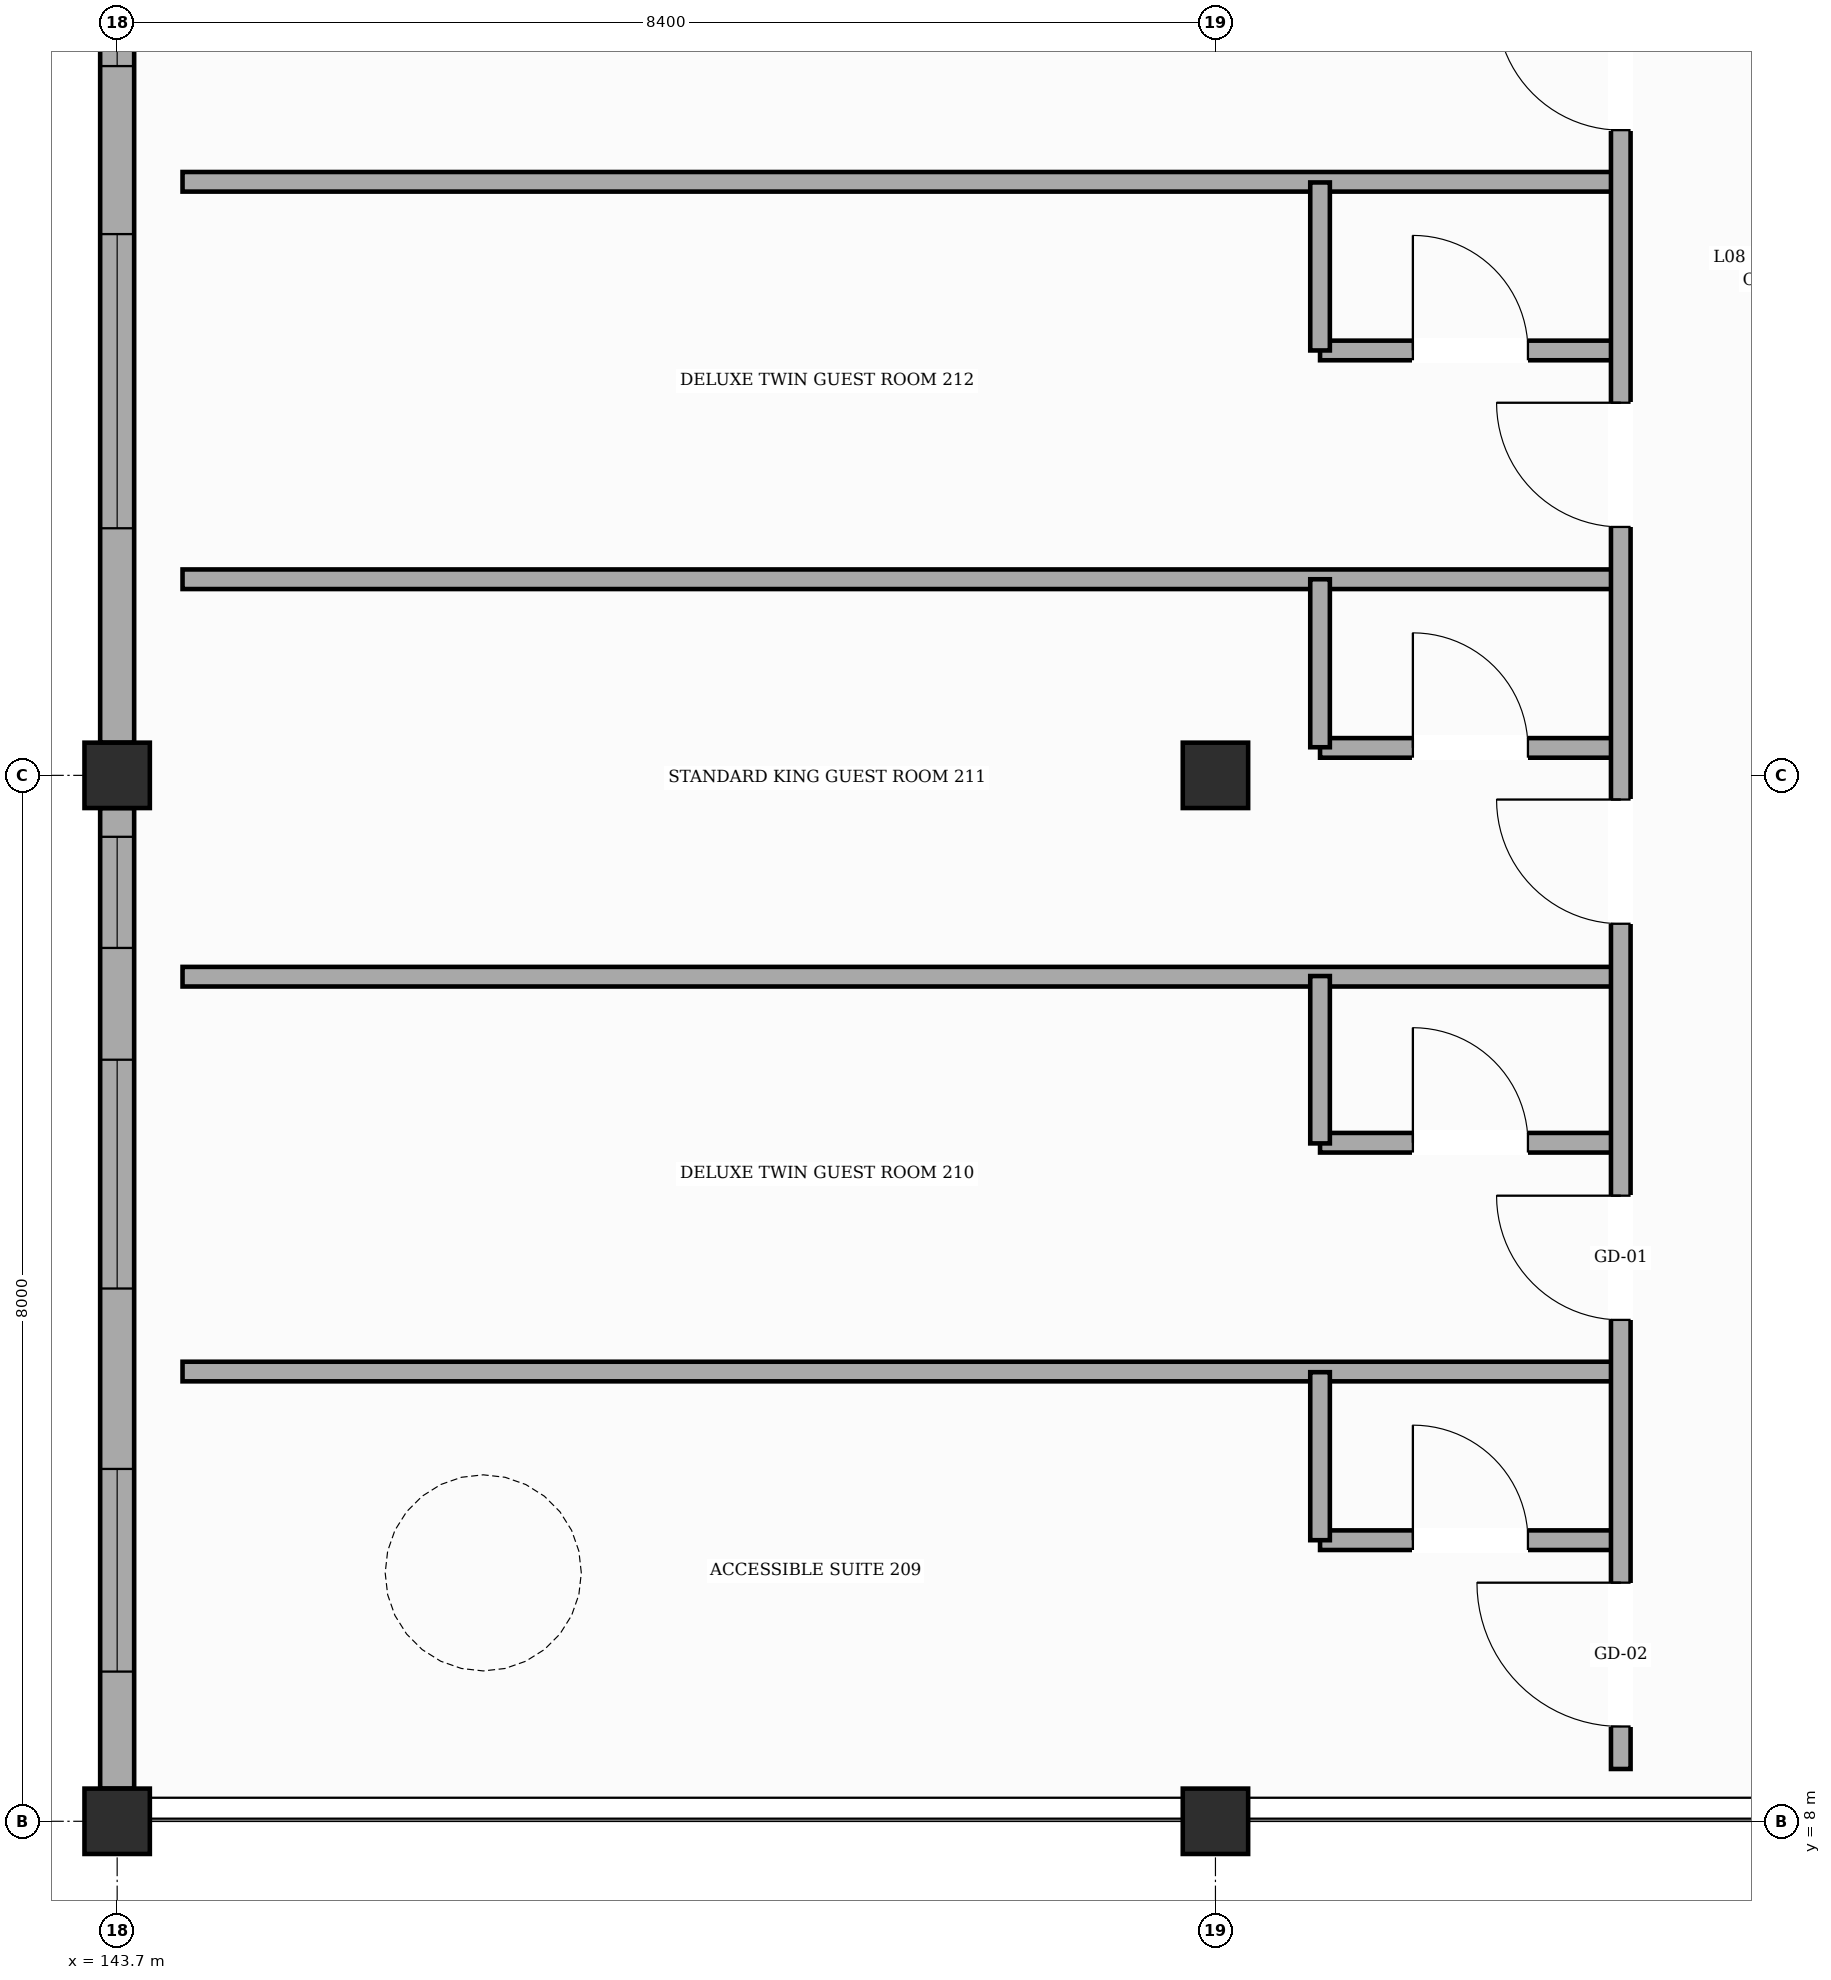
"""IFC4 building model, lengths in metres.
Left out: names, types, materials, properties, quantities, classifications, styles, units other than length and angle.
Written with IfcOpenShell. Run it as: python <this file> out.ifc"""

import sys

from ifc_helpers import new_model, si_unit, direction, frame, frame_2d, origin, origin_2d, place, context, subcontext, project, spatial, rectangle, hollow_rectangle, extrude, element, fill, save


model = new_model("IFC4")
c1 = context("Model", 3, precision=1e-05, world=origin(), true_north=direction((0.0, 1.0)))
c2 = subcontext(c1, "Body", "Model", "MODEL_VIEW")
j1 = project(units=[si_unit("LENGTHUNIT", "METRE"), si_unit("PLANEANGLEUNIT", "RADIAN")], contexts=[c1])
p1 = place(None, origin())
s1 = spatial("IfcSite", under=j1, at=p1, CompositionType="ELEMENT")
p2 = place(p1, origin())
s2 = spatial("IfcBuilding", under=s1, at=p2, CompositionType="ELEMENT")
p3 = place(p2, frame((0.0, 0.0, 35.4)))
s3 = spatial("IfcBuildingStorey", under=s2, at=p3, CompositionType="ELEMENT", Elevation=35.4)
for number, where, z_axis, x_axis in (
    (1, (143.7, 8.0, 0.0), (0.0, 0.0, 1.0), (1.0, 0.0, 0.0)),
    (2, (143.7, 16.0, 0.0), (0.0, 0.0, 1.0), (1.0, 0.0, 0.0)),
    (3, (152.1, 8.0, 0.0), (0.0, 0.0, 1.0), (1.0, 0.0, 0.0)),
    (4, (152.1, 16.0, 0.0), (0.0, 0.0, 1.0), (1.0, 0.0, 0.0)),
):
    element("IfcColumn", number, at=place(p3, frame(where, z_axis=z_axis, x_axis=x_axis)), inside=s3, PredefinedType="COLUMN", context=c2, shape_type="SweptSolid", body=[
        extrude(hollow_rectangle(XDim=0.5, YDim=0.5, WallThickness=0.022, InnerFilletRadius=0.022, OuterFilletRadius=0.044, at=origin_2d()), origin(), (0.0, 0.0, 1.0), 3.6),
    ])
p4 = place(p3, frame((143.7, 8.25, 0.0), z_axis=(0.0, 0.0, 1.0), x_axis=(0.0, 1.0, 0.0)))
e5 = element("IfcWall", 5, at=p4, inside=s3, PredefinedType="SOLIDWALL", context=c2, shape_type="SweptSolid", body=[
    extrude(rectangle(XDim=7.5, YDim=0.26, at=frame_2d((3.75, 0.0))), origin(), (0.0, 0.0, 1.0), 2.805),
])
p5 = place(p4, frame((0.895, 0.0, 0.85)))
e6 = element("IfcOpeningElement", 6, at=p5, cuts=e5, PredefinedType="OPENING", context=c2, shape_type="SweptSolid", body=[
    extrude(rectangle(XDim=1.55, YDim=1.35, at=frame_2d((0.775, 0.675))), frame((0.0, 0.14, 0.0), z_axis=(0.0, -1.0, 0.0), x_axis=(1.0, 0.0, 0.0)), (0.0, 0.0, 1.0), 0.28),
])
p6 = place(p4, frame((3.825, 0.0, 0.85)))
e7 = element("IfcOpeningElement", 7, at=p6, cuts=e5, PredefinedType="OPENING", context=c2, shape_type="SweptSolid", body=[
    extrude(rectangle(XDim=1.75, YDim=1.35, at=frame_2d((0.875, 0.675))), frame((0.0, 0.14, 0.0), z_axis=(0.0, -1.0, 0.0), x_axis=(1.0, 0.0, 0.0)), (0.0, 0.0, 1.0), 0.28),
])
p7 = place(p4, frame((6.43, 0.0, 0.85)))
e8 = element("IfcOpeningElement", 8, at=p7, cuts=e5, PredefinedType="OPENING", context=c2, shape_type="SweptSolid", body=[
    extrude(rectangle(XDim=0.85, YDim=1.35, at=frame_2d((0.425, 0.675))), frame((0.0, 0.14, 0.0), z_axis=(0.0, -1.0, 0.0), x_axis=(1.0, 0.0, 0.0)), (0.0, 0.0, 1.0), 0.28),
])
p8 = place(p3, frame((143.7, 16.25, 0.0), z_axis=(0.0, 0.0, 1.0), x_axis=(0.0, 1.0, 0.0)))
e9 = element("IfcWall", 9, at=p8, inside=s3, PredefinedType="SOLIDWALL", context=c2, shape_type="SweptSolid", body=[
    extrude(rectangle(XDim=7.5, YDim=0.26, at=frame_2d((3.75, 0.0))), origin(), (0.0, 0.0, 1.0), 2.805),
])
p9 = place(p8, frame((1.64, 0.0, 0.85)))
e10 = element("IfcOpeningElement", 10, at=p9, cuts=e9, PredefinedType="OPENING", context=c2, shape_type="SweptSolid", body=[
    extrude(rectangle(XDim=2.25, YDim=1.35, at=frame_2d((1.125, 0.675))), frame((0.0, 0.14, 0.0), z_axis=(0.0, -1.0, 0.0), x_axis=(1.0, 0.0, 0.0)), (0.0, 0.0, 1.0), 0.28),
])
p10 = place(p8, frame((5.175, 0.0, 0.85)))
e11 = element("IfcOpeningElement", 11, at=p10, cuts=e9, PredefinedType="OPENING", context=c2, shape_type="SweptSolid", body=[
    extrude(rectangle(XDim=1.25, YDim=1.35, at=frame_2d((0.625, 0.675))), frame((0.0, 0.14, 0.0), z_axis=(0.0, -1.0, 0.0), x_axis=(1.0, 0.0, 0.0)), (0.0, 0.0, 1.0), 0.28),
])
p11 = place(p3, frame((152.9, 10.15, 0.0), z_axis=(0.0, 0.0, 1.0), x_axis=(1.0, 0.0, 0.0)))
e12 = element("IfcWall", 12, at=p11, inside=s3, PredefinedType="PARTITIONING", context=c2, shape_type="SweptSolid", body=[
    extrude(rectangle(XDim=2.3, YDim=0.15, at=frame_2d((1.15, 0.0))), origin(), (0.0, 0.0, 1.0), 3.365),
])
p12 = place(p11, frame((0.71, 0.0, 0.0)))
e13 = element("IfcOpeningElement", 13, at=p12, cuts=e12, PredefinedType="OPENING", context=c2, shape_type="SweptSolid", body=[
    extrude(rectangle(XDim=0.88, YDim=2.12, at=frame_2d((0.44, 1.06))), frame((0.0, 0.085, 0.0), z_axis=(0.0, -1.0, 0.0), x_axis=(1.0, 0.0, 0.0)), (0.0, 0.0, 1.0), 0.17),
])
p13 = place(p3, frame((144.2, 11.44, 0.0), z_axis=(0.0, 0.0, 1.0), x_axis=(1.0, 0.0, 0.0)))
e14 = element("IfcWall", 14, at=p13, inside=s3, PredefinedType="PARTITIONING", context=c2, shape_type="SweptSolid", body=[
    extrude(rectangle(XDim=11.0, YDim=0.15, at=frame_2d((5.5, 0.0))), origin(), (0.0, 0.0, 1.0), 3.365),
])
p14 = place(p3, frame((152.9, 13.19, 0.0), z_axis=(0.0, 0.0, 1.0), x_axis=(1.0, 0.0, 0.0)))
e15 = element("IfcWall", 15, at=p14, inside=s3, PredefinedType="PARTITIONING", context=c2, shape_type="SweptSolid", body=[
    extrude(rectangle(XDim=2.3, YDim=0.15, at=frame_2d((1.15, 0.0))), origin(), (0.0, 0.0, 1.0), 3.365),
])
p15 = place(p14, frame((0.71, 0.0, 0.0)))
e16 = element("IfcOpeningElement", 16, at=p15, cuts=e15, PredefinedType="OPENING", context=c2, shape_type="SweptSolid", body=[
    extrude(rectangle(XDim=0.88, YDim=2.12, at=frame_2d((0.44, 1.06))), frame((0.0, 0.085, 0.0), z_axis=(0.0, -1.0, 0.0), x_axis=(1.0, 0.0, 0.0)), (0.0, 0.0, 1.0), 0.17),
])
p16 = place(p3, frame((144.2, 14.46, 0.0), z_axis=(0.0, 0.0, 1.0), x_axis=(1.0, 0.0, 0.0)))
e17 = element("IfcWall", 17, at=p16, inside=s3, PredefinedType="PARTITIONING", context=c2, shape_type="SweptSolid", body=[
    extrude(rectangle(XDim=11.0, YDim=0.15, at=frame_2d((5.5, 0.0))), origin(), (0.0, 0.0, 1.0), 3.365),
])
p17 = place(p3, frame((152.9, 16.21, 0.0), z_axis=(0.0, 0.0, 1.0), x_axis=(1.0, 0.0, 0.0)))
e18 = element("IfcWall", 18, at=p17, inside=s3, PredefinedType="PARTITIONING", context=c2, shape_type="SweptSolid", body=[
    extrude(rectangle(XDim=2.3, YDim=0.15, at=frame_2d((1.15, 0.0))), origin(), (0.0, 0.0, 1.0), 2.755),
])
p18 = place(p17, frame((0.71, 0.0, 0.0)))
e19 = element("IfcOpeningElement", 19, at=p18, cuts=e18, PredefinedType="OPENING", context=c2, shape_type="SweptSolid", body=[
    extrude(rectangle(XDim=0.88, YDim=2.12, at=frame_2d((0.44, 1.06))), frame((0.0, 0.085, 0.0), z_axis=(0.0, -1.0, 0.0), x_axis=(1.0, 0.0, 0.0)), (0.0, 0.0, 1.0), 0.17),
])
p19 = place(p3, frame((144.2, 17.5, 0.0), z_axis=(0.0, 0.0, 1.0), x_axis=(1.0, 0.0, 0.0)))
e20 = element("IfcWall", 20, at=p19, inside=s3, PredefinedType="PARTITIONING", context=c2, shape_type="SweptSolid", body=[
    extrude(rectangle(XDim=11.0, YDim=0.15, at=frame_2d((5.5, 0.0))), origin(), (0.0, 0.0, 1.0), 3.365),
])
p20 = place(p3, frame((152.9, 19.25, 0.0), z_axis=(0.0, 0.0, 1.0), x_axis=(1.0, 0.0, 0.0)))
e21 = element("IfcWall", 21, at=p20, inside=s3, PredefinedType="PARTITIONING", context=c2, shape_type="SweptSolid", body=[
    extrude(rectangle(XDim=2.3, YDim=0.15, at=frame_2d((1.15, 0.0))), origin(), (0.0, 0.0, 1.0), 3.365),
])
p21 = place(p20, frame((0.71, 0.0, 0.0)))
e22 = element("IfcOpeningElement", 22, at=p21, cuts=e21, PredefinedType="OPENING", context=c2, shape_type="SweptSolid", body=[
    extrude(rectangle(XDim=0.88, YDim=2.12, at=frame_2d((0.44, 1.06))), frame((0.0, 0.085, 0.0), z_axis=(0.0, -1.0, 0.0), x_axis=(1.0, 0.0, 0.0)), (0.0, 0.0, 1.0), 0.17),
])
p22 = place(p3, frame((144.2, 20.54, 0.0), z_axis=(0.0, 0.0, 1.0), x_axis=(1.0, 0.0, 0.0)))
e23 = element("IfcWall", 23, at=p22, inside=s3, PredefinedType="PARTITIONING", context=c2, shape_type="SweptSolid", body=[
    extrude(rectangle(XDim=11.0, YDim=0.15, at=frame_2d((5.5, 0.0))), origin(), (0.0, 0.0, 1.0), 3.365),
])
p23 = place(p3, frame((152.9, 10.15, 0.0), z_axis=(0.0, 0.0, 1.0), x_axis=(0.0, 1.0, 0.0)))
e24 = element("IfcWall", 24, at=p23, inside=s3, PredefinedType="PARTITIONING", context=c2, shape_type="SweptSolid", body=[
    extrude(rectangle(XDim=1.285, YDim=0.15, at=frame_2d((0.643, 0.0))), origin(), (0.0, 0.0, 1.0), 3.365),
])
p24 = place(p3, frame((152.9, 13.185, 0.0), z_axis=(0.0, 0.0, 1.0), x_axis=(0.0, 1.0, 0.0)))
e25 = element("IfcWall", 25, at=p24, inside=s3, PredefinedType="PARTITIONING", context=c2, shape_type="SweptSolid", body=[
    extrude(rectangle(XDim=1.28, YDim=0.15, at=frame_2d((0.64, 0.0))), origin(), (0.0, 0.0, 1.0), 3.365),
])
for number, where, z_axis, x_axis in (
    (26, (152.9, 16.215, 0.0), (0.0, 0.0, 1.0), (0.0, 1.0, 0.0)),
    (27, (152.9, 19.25, 0.0), (0.0, 0.0, 1.0), (0.0, 1.0, 0.0)),
):
    element("IfcWall", number, at=place(p3, frame(where, z_axis=z_axis, x_axis=x_axis)), inside=s3, PredefinedType="PARTITIONING", context=c2, shape_type="SweptSolid", body=[
        extrude(rectangle(XDim=1.285, YDim=0.15, at=frame_2d((0.643, 0.0))), origin(), (0.0, 0.0, 1.0), 3.365),
    ])
p25 = place(p3, frame((155.2, 8.4, 0.0), z_axis=(0.0, 0.0, 1.0), x_axis=(0.0, 1.0, 0.0)))
e28 = element("IfcWall", 28, at=p25, inside=s3, PredefinedType="PARTITIONING", context=c2, shape_type="SweptSolid", body=[
    extrude(rectangle(XDim=18.2, YDim=0.15, at=frame_2d((9.1, 0.0))), origin(), (0.0, 0.0, 1.0), 3.365),
])
p26 = place(p25, frame((0.325, 0.0, 0.0)))
e29 = element("IfcOpeningElement", 29, at=p26, cuts=e28, PredefinedType="OPENING", context=c2, shape_type="SweptSolid", body=[
    extrude(rectangle(XDim=1.1, YDim=2.2, at=frame_2d((0.55, 1.1))), frame((0.0, 0.085, 0.0), z_axis=(0.0, -1.0, 0.0), x_axis=(1.0, 0.0, 0.0)), (0.0, 0.0, 1.0), 0.17),
])
p27 = place(p25, frame((3.435, 0.0, 0.0)))
e30 = element("IfcOpeningElement", 30, at=p27, cuts=e28, PredefinedType="OPENING", context=c2, shape_type="SweptSolid", body=[
    extrude(rectangle(XDim=0.95, YDim=2.15, at=frame_2d((0.475, 1.075))), frame((0.0, 0.085, 0.0), z_axis=(0.0, -1.0, 0.0), x_axis=(1.0, 0.0, 0.0)), (0.0, 0.0, 1.0), 0.17),
])
p28 = place(p25, frame((6.465, 0.0, 0.0)))
e31 = element("IfcOpeningElement", 31, at=p28, cuts=e28, PredefinedType="OPENING", context=c2, shape_type="SweptSolid", body=[
    extrude(rectangle(XDim=0.95, YDim=2.15, at=frame_2d((0.475, 1.075))), frame((0.0, 0.085, 0.0), z_axis=(0.0, -1.0, 0.0), x_axis=(1.0, 0.0, 0.0)), (0.0, 0.0, 1.0), 0.17),
])
p29 = place(p25, frame((9.5, 0.0, 0.0)))
e32 = element("IfcOpeningElement", 32, at=p29, cuts=e28, PredefinedType="OPENING", context=c2, shape_type="SweptSolid", body=[
    extrude(rectangle(XDim=0.95, YDim=2.15, at=frame_2d((0.475, 1.075))), frame((0.0, 0.085, 0.0), z_axis=(0.0, -1.0, 0.0), x_axis=(1.0, 0.0, 0.0)), (0.0, 0.0, 1.0), 0.17),
])
p30 = place(p25, frame((12.535, 0.0, 0.0)))
e33 = element("IfcOpeningElement", 33, at=p30, cuts=e28, PredefinedType="OPENING", context=c2, shape_type="SweptSolid", body=[
    extrude(rectangle(XDim=0.95, YDim=2.15, at=frame_2d((0.475, 1.075))), frame((0.0, 0.085, 0.0), z_axis=(0.0, -1.0, 0.0), x_axis=(1.0, 0.0, 0.0)), (0.0, 0.0, 1.0), 0.17),
])
p31 = place(p25, frame((15.565, 0.0, 0.0)))
e34 = element("IfcOpeningElement", 34, at=p31, cuts=e28, PredefinedType="OPENING", context=c2, shape_type="SweptSolid", body=[
    extrude(rectangle(XDim=0.95, YDim=2.15, at=frame_2d((0.475, 1.075))), frame((0.0, 0.085, 0.0), z_axis=(0.0, -1.0, 0.0), x_axis=(1.0, 0.0, 0.0)), (0.0, 0.0, 1.0), 0.17),
])
p32 = place(p5, origin())
e35 = element("IfcWindow", 35, at=p32, inside=s3, PartitioningType="SINGLE_PANEL", PredefinedType="WINDOW", context=c2, shape_type="SweptSolid", body=[
    extrude(rectangle(XDim=1.55, YDim=1.35, at=frame_2d((0.775, 0.675))), frame((0.0, 0.03, 0.0), z_axis=(0.0, -1.0, 0.0), x_axis=(1.0, 0.0, 0.0)), (0.0, 0.0, 1.0), 0.06),
])
fill(e6, e35)
p33 = place(p6, origin())
e36 = element("IfcWindow", 36, at=p33, inside=s3, PartitioningType="SINGLE_PANEL", PredefinedType="WINDOW", context=c2, shape_type="SweptSolid", body=[
    extrude(rectangle(XDim=1.75, YDim=1.35, at=frame_2d((0.875, 0.675))), frame((0.0, 0.03, 0.0), z_axis=(0.0, -1.0, 0.0), x_axis=(1.0, 0.0, 0.0)), (0.0, 0.0, 1.0), 0.06),
])
fill(e7, e36)
p34 = place(p7, origin())
e37 = element("IfcWindow", 37, at=p34, inside=s3, PartitioningType="SINGLE_PANEL", PredefinedType="WINDOW", context=c2, shape_type="SweptSolid", body=[
    extrude(rectangle(XDim=0.85, YDim=1.35, at=frame_2d((0.425, 0.675))), frame((0.0, 0.03, 0.0), z_axis=(0.0, -1.0, 0.0), x_axis=(1.0, 0.0, 0.0)), (0.0, 0.0, 1.0), 0.06),
])
fill(e8, e37)
p35 = place(p9, origin())
e38 = element("IfcWindow", 38, at=p35, inside=s3, PartitioningType="SINGLE_PANEL", PredefinedType="WINDOW", context=c2, shape_type="SweptSolid", body=[
    extrude(rectangle(XDim=2.25, YDim=1.35, at=frame_2d((1.125, 0.675))), frame((0.0, 0.03, 0.0), z_axis=(0.0, -1.0, 0.0), x_axis=(1.0, 0.0, 0.0)), (0.0, 0.0, 1.0), 0.06),
])
fill(e10, e38)
p36 = place(p10, origin())
e39 = element("IfcWindow", 39, at=p36, inside=s3, PartitioningType="SINGLE_PANEL", PredefinedType="WINDOW", context=c2, shape_type="SweptSolid", body=[
    extrude(rectangle(XDim=1.25, YDim=1.35, at=frame_2d((0.625, 0.675))), frame((0.0, 0.03, 0.0), z_axis=(0.0, -1.0, 0.0), x_axis=(1.0, 0.0, 0.0)), (0.0, 0.0, 1.0), 0.06),
])
fill(e11, e39)
p37 = place(p26, origin())
e40 = element("IfcDoor", 40, at=p37, inside=s3, OperationType="SINGLE_SWING_RIGHT", PredefinedType="DOOR", context=c2, shape_type="SweptSolid", body=[
    extrude(rectangle(XDim=1.1, YDim=2.2, at=frame_2d((0.55, 1.1))), frame((0.0, 0.025, 0.0), z_axis=(0.0, -1.0, 0.0), x_axis=(1.0, 0.0, 0.0)), (0.0, 0.0, 1.0), 0.05),
])
fill(e29, e40)
p38 = place(p12, origin())
e41 = element("IfcDoor", 41, at=p38, inside=s3, OperationType="SINGLE_SWING_LEFT", PredefinedType="DOOR", context=c2, shape_type="SweptSolid", body=[
    extrude(rectangle(XDim=0.88, YDim=2.12, at=frame_2d((0.44, 1.06))), frame((0.0, 0.025, 0.0), z_axis=(0.0, -1.0, 0.0), x_axis=(1.0, 0.0, 0.0)), (0.0, 0.0, 1.0), 0.05),
])
fill(e13, e41)
p39 = place(p27, origin())
e42 = element("IfcDoor", 42, at=p39, inside=s3, OperationType="SINGLE_SWING_RIGHT", PredefinedType="DOOR", context=c2, shape_type="SweptSolid", body=[
    extrude(rectangle(XDim=0.95, YDim=2.15, at=frame_2d((0.475, 1.075))), frame((0.0, 0.025, 0.0), z_axis=(0.0, -1.0, 0.0), x_axis=(1.0, 0.0, 0.0)), (0.0, 0.0, 1.0), 0.05),
])
fill(e30, e42)
p40 = place(p15, origin())
e43 = element("IfcDoor", 43, at=p40, inside=s3, OperationType="SINGLE_SWING_LEFT", PredefinedType="DOOR", context=c2, shape_type="SweptSolid", body=[
    extrude(rectangle(XDim=0.88, YDim=2.12, at=frame_2d((0.44, 1.06))), frame((0.0, 0.025, 0.0), z_axis=(0.0, -1.0, 0.0), x_axis=(1.0, 0.0, 0.0)), (0.0, 0.0, 1.0), 0.05),
])
fill(e16, e43)
p41 = place(p28, origin())
e44 = element("IfcDoor", 44, at=p41, inside=s3, OperationType="SINGLE_SWING_RIGHT", PredefinedType="DOOR", context=c2, shape_type="SweptSolid", body=[
    extrude(rectangle(XDim=0.95, YDim=2.15, at=frame_2d((0.475, 1.075))), frame((0.0, 0.025, 0.0), z_axis=(0.0, -1.0, 0.0), x_axis=(1.0, 0.0, 0.0)), (0.0, 0.0, 1.0), 0.05),
])
fill(e31, e44)
p42 = place(p18, origin())
e45 = element("IfcDoor", 45, at=p42, inside=s3, OperationType="SINGLE_SWING_LEFT", PredefinedType="DOOR", context=c2, shape_type="SweptSolid", body=[
    extrude(rectangle(XDim=0.88, YDim=2.12, at=frame_2d((0.44, 1.06))), frame((0.0, 0.025, 0.0), z_axis=(0.0, -1.0, 0.0), x_axis=(1.0, 0.0, 0.0)), (0.0, 0.0, 1.0), 0.05),
])
fill(e19, e45)
p43 = place(p29, origin())
e46 = element("IfcDoor", 46, at=p43, inside=s3, OperationType="SINGLE_SWING_RIGHT", PredefinedType="DOOR", context=c2, shape_type="SweptSolid", body=[
    extrude(rectangle(XDim=0.95, YDim=2.15, at=frame_2d((0.475, 1.075))), frame((0.0, 0.025, 0.0), z_axis=(0.0, -1.0, 0.0), x_axis=(1.0, 0.0, 0.0)), (0.0, 0.0, 1.0), 0.05),
])
fill(e32, e46)
p44 = place(p21, origin())
e47 = element("IfcDoor", 47, at=p44, inside=s3, OperationType="SINGLE_SWING_LEFT", PredefinedType="DOOR", context=c2, shape_type="SweptSolid", body=[
    extrude(rectangle(XDim=0.88, YDim=2.12, at=frame_2d((0.44, 1.06))), frame((0.0, 0.025, 0.0), z_axis=(0.0, -1.0, 0.0), x_axis=(1.0, 0.0, 0.0)), (0.0, 0.0, 1.0), 0.05),
])
fill(e22, e47)
p45 = place(p30, origin())
e48 = element("IfcDoor", 48, at=p45, inside=s3, OperationType="SINGLE_SWING_RIGHT", PredefinedType="DOOR", context=c2, shape_type="SweptSolid", body=[
    extrude(rectangle(XDim=0.95, YDim=2.15, at=frame_2d((0.475, 1.075))), frame((0.0, 0.025, 0.0), z_axis=(0.0, -1.0, 0.0), x_axis=(1.0, 0.0, 0.0)), (0.0, 0.0, 1.0), 0.05),
])
fill(e33, e48)
save(model, sys.argv[1])
